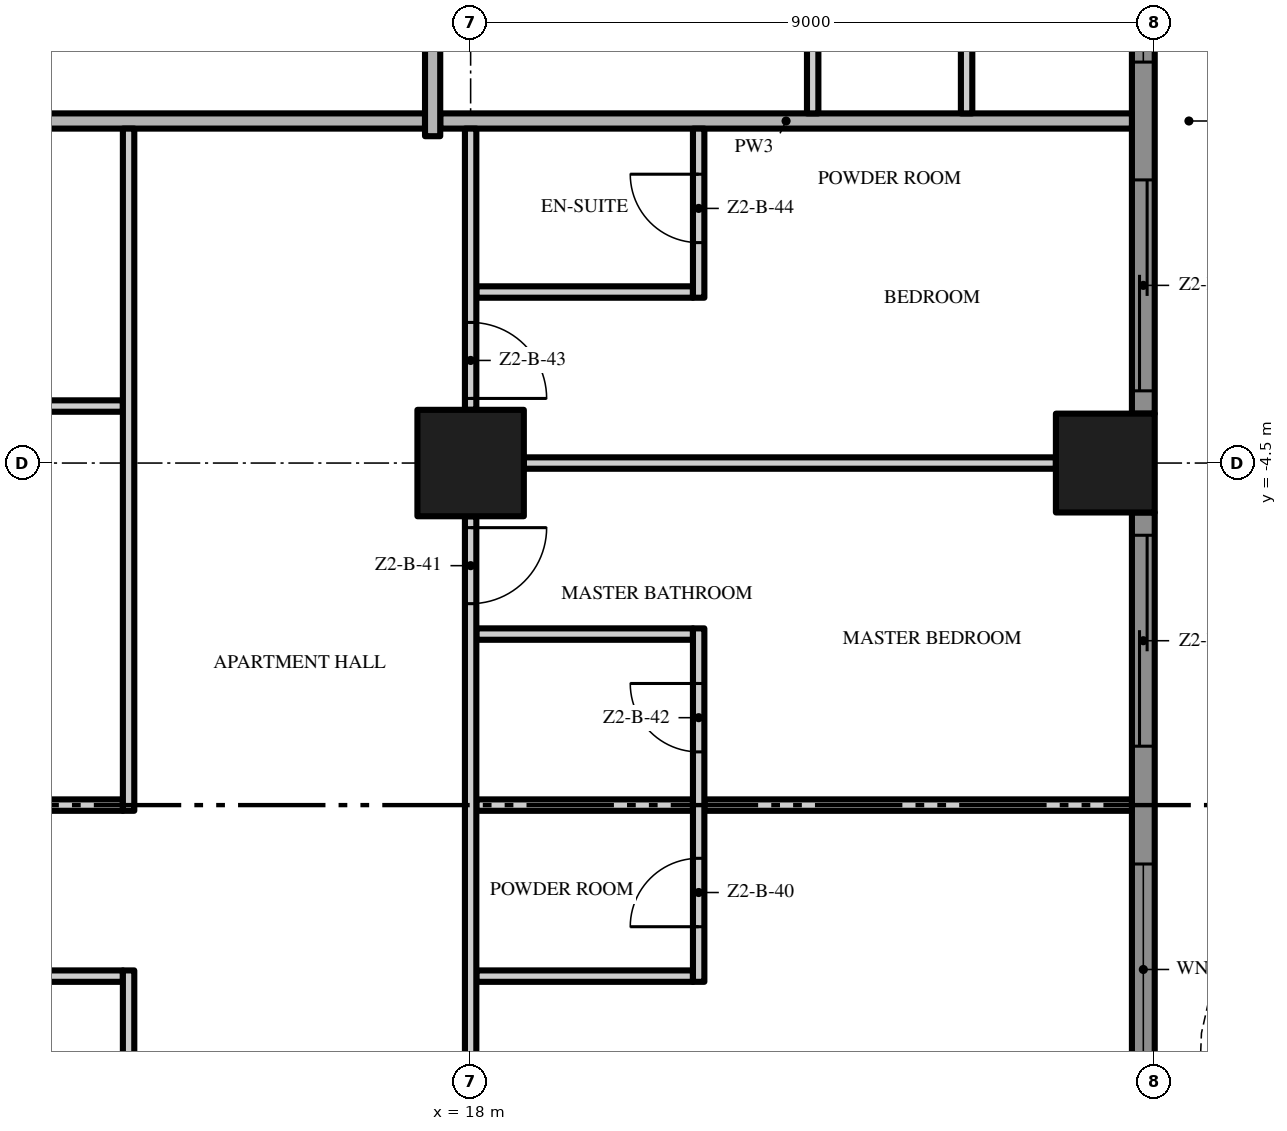
"""IFC4 building model, lengths in metres.
Left out: names, types, materials, properties, quantities, classifications, styles, units other than length and angle.
Written with IfcOpenShell. Run it as: python <this file> out.ifc"""

import sys

from ifc_helpers import new_model, si_unit, direction, frame, frame_2d, origin, origin_2d, place, context, subcontext, project, spatial, polyline, rectangle, outline, extrude, element, fill, save


model = new_model("IFC4")
c1 = context("Model", 3, precision=1e-05, world=origin(), true_north=direction((0.0, 1.0)))
c2 = subcontext(c1, "Body", "Model", "MODEL_VIEW")
j1 = project(units=[si_unit("LENGTHUNIT", "METRE"), si_unit("PLANEANGLEUNIT", "RADIAN")], contexts=[c1])
p1 = place(None, origin())
s1 = spatial("IfcSite", under=j1, at=p1, CompositionType="ELEMENT")
p2 = place(p1, origin())
s2 = spatial("IfcBuilding", under=s1, at=p2, CompositionType="ELEMENT")
p3 = place(p2, frame((0.0, 0.0, 88.4)))
s3 = spatial("IfcBuildingStorey", under=s2, at=p3, CompositionType="ELEMENT", Elevation=88.4)
p4 = place(p3, frame((18.0, -4.5, 0.0), z_axis=(0.0, 0.0, 1.0), x_axis=(1.0, 0.0, 0.0)))
e1 = element("IfcColumn", 1, at=p4, inside=s3, PredefinedType="COLUMN", context=c2, shape_type="SweptSolid", body=[
    extrude(rectangle(XDim=1.4, YDim=1.4, at=origin_2d()), origin(), (0.0, 0.0, 1.0), 3.5),
])
p5 = place(p3, frame((26.35, -4.5, 0.0), z_axis=(0.0, 0.0, 1.0), x_axis=(1.0, 0.0, 0.0)))
e2 = element("IfcColumn", 2, at=p5, inside=s3, PredefinedType="COLUMN", context=c2, shape_type="SweptSolid", body=[
    extrude(rectangle(XDim=1.3, YDim=1.3, at=origin_2d()), origin(), (0.0, 0.0, 1.0), 3.5),
])
p6 = place(p3, frame((26.85, -5.15, 0.0), z_axis=(0.0, 0.0, 1.0), x_axis=(0.0, -1.0, 0.0)))
e3 = element("IfcWall", 3, at=p6, inside=s3, PredefinedType="SOLIDWALL", context=c2, shape_type="SweptSolid", body=[
    extrude(rectangle(XDim=7.7, YDim=0.3, at=frame_2d((3.85, 0.0))), origin(), (0.0, 0.0, 1.0), 3.5),
])
p7 = place(p6, frame((4.625, 0.0, 0.45)))
e4 = element("IfcOpeningElement", 4, at=p7, cuts=e3, PredefinedType="OPENING", context=c2, shape_type="SweptSolid", body=[
    extrude(rectangle(XDim=2.775, YDim=2.65, at=frame_2d((1.387, 1.325))), frame((0.0, 0.16, 0.0), z_axis=(0.0, -1.0, 0.0), x_axis=(1.0, 0.0, 0.0)), (0.0, 0.0, 1.0), 0.32),
])
p8 = place(p6, frame((0.3, 0.0, 0.0)))
e5 = element("IfcOpeningElement", 5, at=p8, cuts=e3, PredefinedType="OPENING", context=c2, shape_type="SweptSolid", body=[
    extrude(rectangle(XDim=2.775, YDim=2.4, at=frame_2d((1.387, 1.2))), frame((0.0, 0.16, 0.0), z_axis=(0.0, -1.0, 0.0), x_axis=(1.0, 0.0, 0.0)), (0.0, 0.0, 1.0), 0.32),
])
p9 = place(p3, frame((26.85, 3.85, 0.0), z_axis=(0.0, 0.0, 1.0), x_axis=(0.0, -1.0, 0.0)))
e6 = element("IfcWall", 6, at=p9, inside=s3, PredefinedType="SOLIDWALL", context=c2, shape_type="SweptSolid", body=[
    extrude(rectangle(XDim=7.7, YDim=0.3, at=frame_2d((3.85, 0.0))), origin(), (0.0, 0.0, 1.0), 3.5),
])
p10 = place(p9, frame((4.625, 0.0, 0.0)))
e7 = element("IfcOpeningElement", 7, at=p10, cuts=e6, PredefinedType="OPENING", context=c2, shape_type="SweptSolid", body=[
    extrude(rectangle(XDim=2.775, YDim=2.4, at=frame_2d((1.387, 1.2))), frame((0.0, 0.16, 0.0), z_axis=(0.0, -1.0, 0.0), x_axis=(1.0, 0.0, 0.0)), (0.0, 0.0, 1.0), 0.32),
])
p11 = place(p9, frame((0.3, 0.0, 0.45)))
e8 = element("IfcOpeningElement", 8, at=p11, cuts=e6, PredefinedType="OPENING", context=c2, shape_type="SweptSolid", body=[
    extrude(rectangle(XDim=2.775, YDim=2.65, at=frame_2d((1.387, 1.325))), frame((0.0, 0.16, 0.0), z_axis=(0.0, -1.0, 0.0), x_axis=(1.0, 0.0, 0.0)), (0.0, 0.0, 1.0), 0.32),
])
p12 = place(p3, origin())
e9 = element("IfcWall", 9, at=p12, inside=s3, PredefinedType="USERDEFINED", context=c2, shape_type="SweptSolid", body=[
    extrude(outline(polyline([(29.649, -18.0), (28.988, -16.5), (28.255, -15.0), (27.731, -13.5), (27.6, -12.375), (27.615, -12.0), (27.951, -10.5), (28.612, -9.0), (29.345, -7.5), (29.869, -6.0), (30.0, -4.875), (29.985, -4.5), (29.649, -3.0), (28.988, -1.5), (28.255, 0.0), (27.731, 1.5), (27.6, 2.625), (27.615, 3.0), (27.951, 4.5), (28.612, 6.0), (29.345, 7.5), (29.869, 9.0), (30.0, 10.125), (29.985, 10.5), (29.649, 12.0), (28.988, 13.5), (28.255, 15.0), (27.731, 16.5), (27.6, 17.625), (27.615, 18.0), (27.365, 18.01), (27.349, 17.615), (27.486, 16.444), (28.024, 14.904), (28.761, 13.395), (29.41, 11.921), (29.736, 10.467), (29.749, 10.135), (29.624, 9.056), (29.114, 7.596), (28.385, 6.105), (27.713, 4.579), (27.366, 3.033), (27.349, 2.615), (27.486, 1.444), (28.024, -0.096), (28.761, -1.605), (29.41, -3.079), (29.736, -4.533), (29.749, -4.865), (29.624, -5.944), (29.114, -7.404), (28.385, -8.895), (27.713, -10.421), (27.366, -11.967), (27.349, -12.385), (27.486, -13.556), (28.024, -15.096), (28.761, -16.605), (29.42, -18.101), (29.649, -18.0)])), origin(), (0.0, 0.0, 1.0), 0.9),
])
p13 = place(p3, frame((13.425, -11.25, 0.0), z_axis=(0.0, 0.0, 1.0), x_axis=(-1.0, 0.0, 0.0)))
e10 = element("IfcWall", 10, at=p13, inside=s3, PredefinedType="PARTITIONING", context=c2, shape_type="SweptSolid", body=[
    extrude(rectangle(XDim=4.35, YDim=0.15, at=frame_2d((2.175, 0.0))), origin(), (0.0, 0.0, 1.0), 3.5),
])
p14 = place(p13, frame((1.7, 0.0, 0.0)))
e11 = element("IfcOpeningElement", 11, at=p14, cuts=e10, PredefinedType="OPENING", context=c2, shape_type="SweptSolid", body=[
    extrude(rectangle(XDim=0.9, YDim=2.1, at=frame_2d((0.45, 1.05))), frame((0.0, 0.085, 0.0), z_axis=(0.0, -1.0, 0.0), x_axis=(1.0, 0.0, 0.0)), (0.0, 0.0, 1.0), 0.17),
])
p15 = place(p3, frame((18.075, -11.25, 0.0), z_axis=(0.0, 0.0, 1.0), x_axis=(1.0, 0.0, 0.0)))
e12 = element("IfcWall", 12, at=p15, inside=s3, PredefinedType="PARTITIONING", context=c2, shape_type="SweptSolid", body=[
    extrude(rectangle(XDim=2.85, YDim=0.15, at=frame_2d((1.425, 0.0))), origin(), (0.0, 0.0, 1.0), 3.5),
])
p16 = place(p3, frame((9.075, -9.0, 0.0), z_axis=(0.0, 0.0, 1.0), x_axis=(1.0, 0.0, 0.0)))
e13 = element("IfcWall", 13, at=p16, inside=s3, PredefinedType="PARTITIONING", context=c2, shape_type="SweptSolid", body=[
    extrude(rectangle(XDim=4.35, YDim=0.15, at=frame_2d((2.175, 0.0))), origin(), (0.0, 0.0, 1.0), 3.5),
])
p17 = place(p3, frame((18.075, -9.0, 0.0), z_axis=(0.0, 0.0, 1.0), x_axis=(1.0, 0.0, 0.0)))
e14 = element("IfcWall", 14, at=p17, inside=s3, PredefinedType="PARTITIONING", context=c2, shape_type="SweptSolid", body=[
    extrude(rectangle(XDim=2.85, YDim=0.15, at=frame_2d((1.425, 0.0))), origin(), (0.0, 0.0, 1.0), 3.5),
])
p18 = place(p3, frame((21.075, -9.0, 0.0), z_axis=(0.0, 0.0, 1.0), x_axis=(1.0, 0.0, 0.0)))
e15 = element("IfcWall", 15, at=p18, inside=s3, PredefinedType="PARTITIONING", context=c2, shape_type="SweptSolid", body=[
    extrude(rectangle(XDim=5.625, YDim=0.15, at=frame_2d((2.812, 0.0))), origin(), (0.0, 0.0, 1.0), 3.5),
])
p19 = place(p3, frame((18.075, -6.75, 0.0), z_axis=(0.0, 0.0, 1.0), x_axis=(1.0, 0.0, 0.0)))
e16 = element("IfcWall", 16, at=p19, inside=s3, PredefinedType="PARTITIONING", context=c2, shape_type="SweptSolid", body=[
    extrude(rectangle(XDim=2.85, YDim=0.15, at=frame_2d((1.425, 0.0))), origin(), (0.0, 0.0, 1.0), 3.5),
])
p20 = place(p3, frame((18.7, -4.5, 0.0), z_axis=(0.0, 0.0, 1.0), x_axis=(1.0, 0.0, 0.0)))
e17 = element("IfcWall", 17, at=p20, inside=s3, PredefinedType="PARTITIONING", context=c2, shape_type="SweptSolid", body=[
    extrude(rectangle(XDim=7.0, YDim=0.15, at=frame_2d((3.5, 0.0))), origin(), (0.0, 0.0, 1.0), 3.5),
])
p21 = place(p3, frame((9.7, -3.75, 0.0), z_axis=(0.0, 0.0, 1.0), x_axis=(1.0, 0.0, 0.0)))
e18 = element("IfcWall", 18, at=p21, inside=s3, PredefinedType="PARTITIONING", context=c2, shape_type="SweptSolid", body=[
    extrude(rectangle(XDim=3.725, YDim=0.15, at=frame_2d((1.863, 0.0))), origin(), (0.0, 0.0, 1.0), 3.5),
])
p22 = place(p21, frame((1.1, 0.0, 0.0)))
e19 = element("IfcOpeningElement", 19, at=p22, cuts=e18, PredefinedType="OPENING", context=c2, shape_type="SweptSolid", body=[
    extrude(rectangle(XDim=0.9, YDim=2.1, at=frame_2d((0.45, 1.05))), frame((0.0, 0.085, 0.0), z_axis=(0.0, -1.0, 0.0), x_axis=(1.0, 0.0, 0.0)), (0.0, 0.0, 1.0), 0.17),
])
p23 = place(p3, frame((18.075, -2.25, 0.0), z_axis=(0.0, 0.0, 1.0), x_axis=(1.0, 0.0, 0.0)))
e20 = element("IfcWall", 20, at=p23, inside=s3, PredefinedType="PARTITIONING", context=c2, shape_type="SweptSolid", body=[
    extrude(rectangle(XDim=2.85, YDim=0.15, at=frame_2d((1.425, 0.0))), origin(), (0.0, 0.0, 1.0), 3.5),
])
p24 = place(p3, frame((4.6, 0.0, 0.0), z_axis=(0.0, 0.0, 1.0), x_axis=(1.0, 0.0, 0.0)))
e21 = element("IfcWall", 21, at=p24, inside=s3, PredefinedType="PARTITIONING", context=c2, shape_type="SweptSolid", body=[
    extrude(rectangle(XDim=12.8, YDim=0.2, at=frame_2d((6.4, 0.0))), origin(), (0.0, 0.0, 1.0), 3.5),
])
p25 = place(p3, frame((17.6, 0.0, 0.0), z_axis=(0.0, 0.0, 1.0), x_axis=(1.0, 0.0, 0.0)))
e22 = element("IfcWall", 22, at=p25, inside=s3, PredefinedType="PARTITIONING", context=c2, shape_type="SweptSolid", body=[
    extrude(rectangle(XDim=9.1, YDim=0.2, at=frame_2d((4.55, 0.0))), origin(), (0.0, 0.0, 1.0), 3.5),
])
p26 = place(p3, frame((13.5, -22.2, 0.0), z_axis=(0.0, 0.0, 1.0), x_axis=(0.0, 1.0, 0.0)))
e23 = element("IfcWall", 23, at=p26, inside=s3, PredefinedType="PARTITIONING", context=c2, shape_type="SweptSolid", body=[
    extrude(rectangle(XDim=11.025, YDim=0.15, at=frame_2d((5.513, 0.0))), origin(), (0.0, 0.0, 1.0), 3.5),
])
p27 = place(p3, frame((13.5, -9.075, 0.0), z_axis=(0.0, 0.0, 1.0), x_axis=(0.0, 1.0, 0.0)))
e24 = element("IfcWall", 24, at=p27, inside=s3, PredefinedType="PARTITIONING", context=c2, shape_type="SweptSolid", body=[
    extrude(rectangle(XDim=8.975, YDim=0.15, at=frame_2d((4.487, 0.0))), origin(), (0.0, 0.0, 1.0), 3.5),
])
p28 = place(p3, frame((17.5, -0.2, 0.0), z_axis=(0.0, 0.0, 1.0), x_axis=(0.0, 1.0, 0.0)))
e25 = element("IfcWall", 25, at=p28, inside=s3, PredefinedType="PARTITIONING", context=c2, shape_type="SweptSolid", body=[
    extrude(rectangle(XDim=4.0, YDim=0.2, at=frame_2d((2.0, 0.0))), origin(), (0.0, 0.0, 1.0), 3.5),
])
p29 = place(p3, frame((18.0, -5.2, 0.0), z_axis=(0.0, 0.0, 1.0), x_axis=(0.0, -1.0, 0.0)))
e26 = element("IfcWall", 26, at=p29, inside=s3, PredefinedType="PARTITIONING", context=c2, shape_type="SweptSolid", body=[
    extrude(rectangle(XDim=7.6, YDim=0.15, at=frame_2d((3.8, 0.0))), origin(), (0.0, 0.0, 1.0), 3.5),
])
p30 = place(p29, frame((0.15, 0.0, 0.0)))
e27 = element("IfcOpeningElement", 27, at=p30, cuts=e26, PredefinedType="OPENING", context=c2, shape_type="SweptSolid", body=[
    extrude(rectangle(XDim=1.0, YDim=2.4, at=frame_2d((0.5, 1.2))), frame((0.0, 0.085, 0.0), z_axis=(0.0, -1.0, 0.0), x_axis=(1.0, 0.0, 0.0)), (0.0, 0.0, 1.0), 0.17),
])
p31 = place(p3, frame((18.0, -0.1, 0.0), z_axis=(0.0, 0.0, 1.0), x_axis=(0.0, -1.0, 0.0)))
e28 = element("IfcWall", 28, at=p31, inside=s3, PredefinedType="PARTITIONING", context=c2, shape_type="SweptSolid", body=[
    extrude(rectangle(XDim=3.7, YDim=0.15, at=frame_2d((1.85, 0.0))), origin(), (0.0, 0.0, 1.0), 3.5),
])
p32 = place(p31, frame((2.55, 0.0, 0.0)))
e29 = element("IfcOpeningElement", 29, at=p32, cuts=e28, PredefinedType="OPENING", context=c2, shape_type="SweptSolid", body=[
    extrude(rectangle(XDim=1.0, YDim=2.4, at=frame_2d((0.5, 1.2))), frame((0.0, 0.085, 0.0), z_axis=(0.0, -1.0, 0.0), x_axis=(1.0, 0.0, 0.0)), (0.0, 0.0, 1.0), 0.17),
])
p33 = place(p3, frame((21.0, -11.325, 0.0), z_axis=(0.0, 0.0, 1.0), x_axis=(0.0, 1.0, 0.0)))
e30 = element("IfcWall", 30, at=p33, inside=s3, PredefinedType="PARTITIONING", context=c2, shape_type="SweptSolid", body=[
    extrude(rectangle(XDim=4.65, YDim=0.15, at=frame_2d((2.325, 0.0))), origin(), (0.0, 0.0, 1.0), 3.5),
])
p34 = place(p33, frame((0.725, 0.0, 0.0)))
e31 = element("IfcOpeningElement", 31, at=p34, cuts=e30, PredefinedType="OPENING", context=c2, shape_type="SweptSolid", body=[
    extrude(rectangle(XDim=0.9, YDim=2.1, at=frame_2d((0.45, 1.05))), frame((0.0, 0.085, 0.0), z_axis=(0.0, -1.0, 0.0), x_axis=(1.0, 0.0, 0.0)), (0.0, 0.0, 1.0), 0.17),
])
p35 = place(p33, frame((3.025, 0.0, 0.0)))
e32 = element("IfcOpeningElement", 32, at=p35, cuts=e30, PredefinedType="OPENING", context=c2, shape_type="SweptSolid", body=[
    extrude(rectangle(XDim=0.9, YDim=2.1, at=frame_2d((0.45, 1.05))), frame((0.0, 0.085, 0.0), z_axis=(0.0, -1.0, 0.0), x_axis=(1.0, 0.0, 0.0)), (0.0, 0.0, 1.0), 0.17),
])
p36 = place(p3, frame((21.0, -2.325, 0.0), z_axis=(0.0, 0.0, 1.0), x_axis=(0.0, 1.0, 0.0)))
e33 = element("IfcWall", 33, at=p36, inside=s3, PredefinedType="PARTITIONING", context=c2, shape_type="SweptSolid", body=[
    extrude(rectangle(XDim=2.225, YDim=0.15, at=frame_2d((1.113, 0.0))), origin(), (0.0, 0.0, 1.0), 3.5),
])
p37 = place(p36, frame((0.725, 0.0, 0.0)))
e34 = element("IfcOpeningElement", 34, at=p37, cuts=e33, PredefinedType="OPENING", context=c2, shape_type="SweptSolid", body=[
    extrude(rectangle(XDim=0.9, YDim=2.1, at=frame_2d((0.45, 1.05))), frame((0.0, 0.085, 0.0), z_axis=(0.0, -1.0, 0.0), x_axis=(1.0, 0.0, 0.0)), (0.0, 0.0, 1.0), 0.17),
])
p38 = place(p3, frame((22.5, 17.35, 0.0), z_axis=(0.0, 0.0, 1.0), x_axis=(0.0, -1.0, 0.0)))
e35 = element("IfcWall", 35, at=p38, inside=s3, PredefinedType="PARTITIONING", context=c2, shape_type="SweptSolid", body=[
    extrude(rectangle(XDim=17.25, YDim=0.15, at=frame_2d((8.625, 0.0))), origin(), (0.0, 0.0, 1.0), 3.5),
])
p39 = place(p38, frame((13.05, 0.0, 0.0)))
e36 = element("IfcOpeningElement", 36, at=p39, cuts=e35, PredefinedType="OPENING", context=c2, shape_type="SweptSolid", body=[
    extrude(rectangle(XDim=1.8, YDim=2.4, at=frame_2d((0.9, 1.2))), frame((0.0, 0.085, 0.0), z_axis=(0.0, -1.0, 0.0), x_axis=(1.0, 0.0, 0.0)), (0.0, 0.0, 1.0), 0.17),
])
p40 = place(p38, frame((5.6, 0.0, 0.0)))
e37 = element("IfcOpeningElement", 37, at=p40, cuts=e35, PredefinedType="OPENING", context=c2, shape_type="SweptSolid", body=[
    extrude(rectangle(XDim=1.0, YDim=2.4, at=frame_2d((0.5, 1.2))), frame((0.0, 0.085, 0.0), z_axis=(0.0, -1.0, 0.0), x_axis=(1.0, 0.0, 0.0)), (0.0, 0.0, 1.0), 0.17),
])
p41 = place(p3, frame((24.525, 0.1, 0.0), z_axis=(0.0, 0.0, 1.0), x_axis=(0.0, 1.0, 0.0)))
e38 = element("IfcWall", 38, at=p41, inside=s3, PredefinedType="PARTITIONING", context=c2, shape_type="SweptSolid", body=[
    extrude(rectangle(XDim=2.225, YDim=0.15, at=frame_2d((1.113, 0.0))), origin(), (0.0, 0.0, 1.0), 3.5),
])
p42 = place(p7, origin())
e39 = element("IfcWindow", 39, at=p42, inside=s3, PartitioningType="SINGLE_PANEL", PredefinedType="WINDOW", context=c2, shape_type="SweptSolid", body=[
    extrude(rectangle(XDim=2.775, YDim=2.65, at=frame_2d((1.387, 1.325))), frame((0.0, 0.03, 0.0), z_axis=(0.0, -1.0, 0.0), x_axis=(1.0, 0.0, 0.0)), (0.0, 0.0, 1.0), 0.06),
])
fill(e4, e39)
p43 = place(p8, origin())
e40 = element("IfcDoor", 40, at=p43, inside=s3, OperationType="SINGLE_SWING_LEFT", PredefinedType="DOOR", context=c2, shape_type="SweptSolid", body=[
    extrude(rectangle(XDim=2.775, YDim=2.4, at=frame_2d((1.387, 1.2))), frame((0.0, 0.025, 0.0), z_axis=(0.0, -1.0, 0.0), x_axis=(1.0, 0.0, 0.0)), (0.0, 0.0, 1.0), 0.05),
])
fill(e5, e40)
p44 = place(p10, origin())
e41 = element("IfcDoor", 41, at=p44, inside=s3, OperationType="SINGLE_SWING_LEFT", PredefinedType="DOOR", context=c2, shape_type="SweptSolid", body=[
    extrude(rectangle(XDim=2.775, YDim=2.4, at=frame_2d((1.387, 1.2))), frame((0.0, 0.025, 0.0), z_axis=(0.0, -1.0, 0.0), x_axis=(1.0, 0.0, 0.0)), (0.0, 0.0, 1.0), 0.05),
])
fill(e7, e41)
p45 = place(p11, origin())
e42 = element("IfcWindow", 42, at=p45, inside=s3, PartitioningType="SINGLE_PANEL", PredefinedType="WINDOW", context=c2, shape_type="SweptSolid", body=[
    extrude(rectangle(XDim=2.775, YDim=2.65, at=frame_2d((1.387, 1.325))), frame((0.0, 0.03, 0.0), z_axis=(0.0, -1.0, 0.0), x_axis=(1.0, 0.0, 0.0)), (0.0, 0.0, 1.0), 0.06),
])
fill(e8, e42)
p46 = place(p34, origin())
e43 = element("IfcDoor", 43, at=p46, inside=s3, OperationType="SINGLE_SWING_LEFT", PredefinedType="DOOR", context=c2, shape_type="SweptSolid", body=[
    extrude(rectangle(XDim=0.9, YDim=2.1, at=frame_2d((0.45, 1.05))), frame((0.0, 0.025, 0.0), z_axis=(0.0, -1.0, 0.0), x_axis=(1.0, 0.0, 0.0)), (0.0, 0.0, 1.0), 0.05),
])
fill(e31, e43)
p47 = place(p30, origin())
e44 = element("IfcDoor", 44, at=p47, inside=s3, OperationType="SINGLE_SWING_LEFT", PredefinedType="DOOR", context=c2, shape_type="SweptSolid", body=[
    extrude(rectangle(XDim=1.0, YDim=2.4, at=frame_2d((0.5, 1.2))), frame((0.0, 0.025, 0.0), z_axis=(0.0, -1.0, 0.0), x_axis=(1.0, 0.0, 0.0)), (0.0, 0.0, 1.0), 0.05),
])
fill(e27, e44)
p48 = place(p35, origin())
e45 = element("IfcDoor", 45, at=p48, inside=s3, OperationType="SINGLE_SWING_RIGHT", PredefinedType="DOOR", context=c2, shape_type="SweptSolid", body=[
    extrude(rectangle(XDim=0.9, YDim=2.1, at=frame_2d((0.45, 1.05))), frame((0.0, 0.025, 0.0), z_axis=(0.0, -1.0, 0.0), x_axis=(1.0, 0.0, 0.0)), (0.0, 0.0, 1.0), 0.05),
])
fill(e32, e45)
p49 = place(p32, origin())
e46 = element("IfcDoor", 46, at=p49, inside=s3, OperationType="SINGLE_SWING_RIGHT", PredefinedType="DOOR", context=c2, shape_type="SweptSolid", body=[
    extrude(rectangle(XDim=1.0, YDim=2.4, at=frame_2d((0.5, 1.2))), frame((0.0, 0.025, 0.0), z_axis=(0.0, -1.0, 0.0), x_axis=(1.0, 0.0, 0.0)), (0.0, 0.0, 1.0), 0.05),
])
fill(e29, e46)
p50 = place(p37, origin())
e47 = element("IfcDoor", 47, at=p50, inside=s3, OperationType="SINGLE_SWING_RIGHT", PredefinedType="DOOR", context=c2, shape_type="SweptSolid", body=[
    extrude(rectangle(XDim=0.9, YDim=2.1, at=frame_2d((0.45, 1.05))), frame((0.0, 0.025, 0.0), z_axis=(0.0, -1.0, 0.0), x_axis=(1.0, 0.0, 0.0)), (0.0, 0.0, 1.0), 0.05),
])
fill(e34, e47)
save(model, sys.argv[1])
